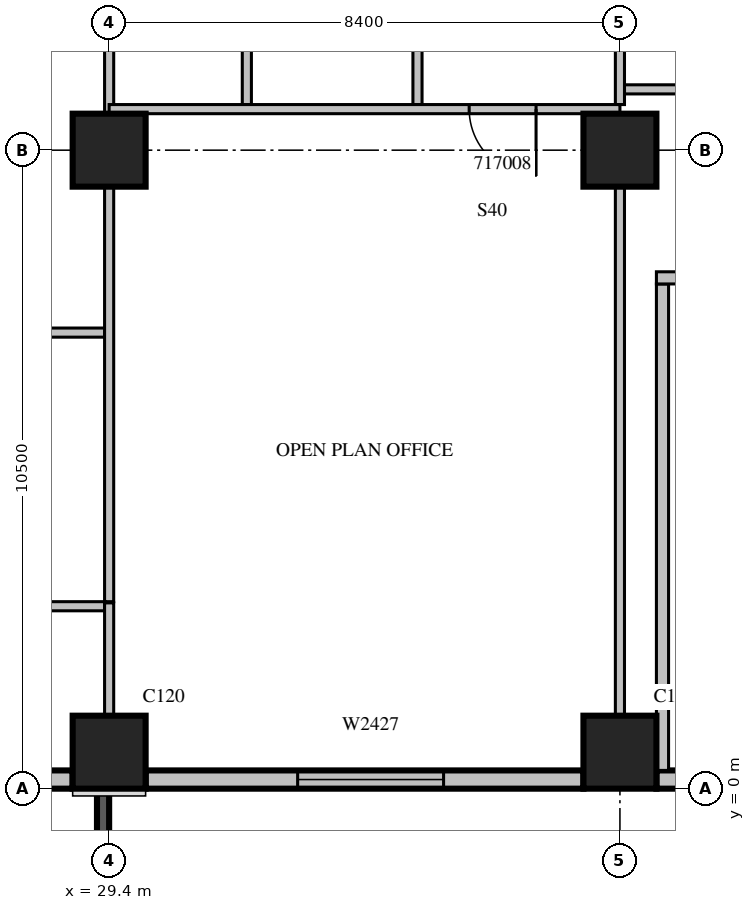
"""IFC4 building model, lengths in metres.
Left out: names, types, materials, properties, quantities, classifications, styles, units other than length and angle.
Written with IfcOpenShell. Run it as: python <this file> out.ifc"""

import sys

from ifc_helpers import new_model, si_unit, direction, frame, frame_2d, origin, origin_2d, place, context, subcontext, project, spatial, rectangle, extrude, source, transform, mapped, element, fill, save


model = new_model("IFC4")
c1 = context("Model", 3, precision=1e-05, world=origin(), true_north=direction((0.0, 1.0)))
c2 = subcontext(c1, "Body", "Model", "MODEL_VIEW")
j1 = project(units=[si_unit("LENGTHUNIT", "METRE"), si_unit("PLANEANGLEUNIT", "RADIAN")], contexts=[c1])
p1 = place(None, origin())
s1 = spatial("IfcSite", under=j1, at=p1, CompositionType="ELEMENT")
p2 = place(p1, origin())
s2 = spatial("IfcBuilding", under=s1, at=p2, CompositionType="ELEMENT")
p3 = place(p2, frame((0.0, 0.0, 82.5)))
s3 = spatial("IfcBuildingStorey", under=s2, at=p3, CompositionType="ELEMENT", Elevation=82.5)
m1 = source(origin(), c2, "Body", "SweptSolid", [
    extrude(rectangle(XDim=1.2, YDim=1.2, at=origin_2d()), origin(), (0.0, 0.0, 1.0), 4.2),
])
for number, where, z_axis, x_axis in (
    (1, (29.4, 0.6, 0.0), (0.0, 0.0, 1.0), (1.0, 0.0, 0.0)),
    (2, (37.8, 0.6, 0.0), (0.0, 0.0, 1.0), (1.0, 0.0, 0.0)),
    (3, (29.4, 10.5, 0.0), (0.0, 0.0, 1.0), (1.0, 0.0, 0.0)),
    (4, (37.8, 10.5, 0.0), (0.0, 0.0, 1.0), (1.0, 0.0, 0.0)),
):
    element("IfcColumn", number, at=place(p3, frame(where, z_axis=z_axis, x_axis=x_axis)), inside=s3, PredefinedType="COLUMN", context=c2, shape_type="MappedRepresentation", body=[
        mapped(m1, transform((0.0, 0.0, 0.0), scale=1.0)),
    ])
m2 = source(origin(), c2, "Body", "SweptSolid", [
    extrude(rectangle(XDim=3.9, YDim=0.2, at=frame_2d((1.95, 0.0))), origin(), (0.0, 0.0, 1.0), 3.8),
])
p4 = place(p3, frame((29.3, 0.0, 0.0), z_axis=(0.0, 0.0, 1.0), x_axis=(0.0, -1.0, 0.0)))
e5 = element("IfcWall", 5, at=p4, inside=s3, PredefinedType="SOLIDWALL", context=c2, shape_type="MappedRepresentation", body=[
    mapped(m2, transform((0.0, 0.0, 0.0), scale=1.0)),
])
m3 = source(origin(), c2, "Body", "SweptSolid", [
    extrude(rectangle(XDim=2.4, YDim=2.7, at=frame_2d((1.2, 1.35))), frame((0.0, 0.11, 0.0), z_axis=(0.0, -1.0, 0.0), x_axis=(1.0, 0.0, 0.0)), (0.0, 0.0, 1.0), 0.22),
])
p5 = place(p4, frame((0.75, 0.0, 0.6)))
e6 = element("IfcOpeningElement", 6, at=p5, cuts=e5, PredefinedType="OPENING", context=c2, shape_type="MappedRepresentation", body=[
    mapped(m3, transform((0.0, 0.0, 0.0), scale=1.0)),
])
m4 = source(origin(), c2, "Body", "SweptSolid", [
    extrude(rectangle(XDim=7.2, YDim=0.3, at=frame_2d((3.6, 0.0))), origin(), (0.0, 0.0, 1.0), 3.8),
])
p6 = place(p3, frame((21.6, 0.15, 0.0), z_axis=(0.0, 0.0, 1.0), x_axis=(1.0, 0.0, 0.0)))
e7 = element("IfcWall", 7, at=p6, inside=s3, PredefinedType="STANDARD", context=c2, shape_type="MappedRepresentation", body=[
    mapped(m4, transform((0.0, 0.0, 0.0), scale=1.0)),
])
m5 = source(origin(), c2, "Body", "SweptSolid", [
    extrude(rectangle(XDim=2.4, YDim=2.7, at=frame_2d((1.2, 1.35))), frame((0.0, 0.16, 0.0), z_axis=(0.0, -1.0, 0.0), x_axis=(1.0, 0.0, 0.0)), (0.0, 0.0, 1.0), 0.32),
])
p7 = place(p6, frame((0.3, 0.0, 0.6)))
e8 = element("IfcOpeningElement", 8, at=p7, cuts=e7, PredefinedType="OPENING", context=c2, shape_type="MappedRepresentation", body=[
    mapped(m5, transform((0.0, 0.0, 0.0), scale=1.0)),
])
m6 = source(origin(), c2, "Body", "SweptSolid", [
    extrude(rectangle(XDim=1.0, YDim=2.1, at=frame_2d((0.5, 1.05))), frame((0.0, 0.16, 0.0), z_axis=(0.0, -1.0, 0.0), x_axis=(1.0, 0.0, 0.0)), (0.0, 0.0, 1.0), 0.32),
])
p8 = place(p6, frame((5.2, 0.0, 0.0)))
e9 = element("IfcOpeningElement", 9, at=p8, cuts=e7, PredefinedType="OPENING", context=c2, shape_type="MappedRepresentation", body=[
    mapped(m6, transform((0.0, 0.0, 0.0), scale=1.0)),
])
p9 = place(p3, frame((30.0, 0.15, 0.0), z_axis=(0.0, 0.0, 1.0), x_axis=(1.0, 0.0, 0.0)))
e10 = element("IfcWall", 10, at=p9, inside=s3, PredefinedType="STANDARD", context=c2, shape_type="MappedRepresentation", body=[
    mapped(m4, transform((0.0, 0.0, 0.0), scale=1.0)),
])
p10 = place(p9, frame((2.5, 0.0, 0.6)))
e11 = element("IfcOpeningElement", 11, at=p10, cuts=e10, PredefinedType="OPENING", context=c2, shape_type="MappedRepresentation", body=[
    mapped(m5, transform((0.0, 0.0, 0.0), scale=1.0)),
])
m7 = source(origin(), c2, "Body", "SweptSolid", [
    extrude(rectangle(XDim=1.8, YDim=0.3, at=frame_2d((0.9, 0.0))), origin(), (0.0, 0.0, 1.0), 3.8),
])
p11 = place(p3, frame((38.4, 0.15, 0.0), z_axis=(0.0, 0.0, 1.0), x_axis=(1.0, 0.0, 0.0)))
e12 = element("IfcWall", 12, at=p11, inside=s3, PredefinedType="STANDARD", context=c2, shape_type="MappedRepresentation", body=[
    mapped(m7, transform((0.0, 0.0, 0.0), scale=1.0)),
])
m8 = source(origin(), c2, "Body", "SweptSolid", [
    extrude(rectangle(XDim=8.0, YDim=0.2, at=frame_2d((4.0, 0.0))), origin(), (0.0, 0.0, 1.0), 3.8),
])
p12 = place(p3, frame((38.5, 0.3, 0.0), z_axis=(0.0, 0.0, 1.0), x_axis=(0.0, 1.0, 0.0)))
e13 = element("IfcWall", 13, at=p12, inside=s3, PredefinedType="PARTITIONING", context=c2, shape_type="MappedRepresentation", body=[
    mapped(m8, transform((0.0, 0.0, 0.0), scale=1.0)),
])
m9 = source(origin(), c2, "Body", "SweptSolid", [
    extrude(rectangle(XDim=5.45, YDim=0.2, at=frame_2d((2.725, 0.0))), origin(), (0.0, 0.0, 1.0), 3.8),
])
p13 = place(p3, frame((38.4, 8.4, 0.0), z_axis=(0.0, 0.0, 1.0), x_axis=(1.0, 0.0, 0.0)))
e14 = element("IfcWall", 14, at=p13, inside=s3, PredefinedType="PARTITIONING", context=c2, shape_type="MappedRepresentation", body=[
    mapped(m9, transform((0.0, 0.0, 0.0), scale=1.0)),
])
m10 = source(origin(), c2, "Body", "SweptSolid", [
    extrude(rectangle(XDim=1.2, YDim=2.1, at=frame_2d((0.6, 1.05))), frame((0.0, 0.11, 0.0), z_axis=(0.0, -1.0, 0.0), x_axis=(1.0, 0.0, 0.0)), (0.0, 0.0, 1.0), 0.22),
])
p14 = place(p13, frame((0.4, 0.0, 0.0)))
e15 = element("IfcOpeningElement", 15, at=p14, cuts=e14, PredefinedType="OPENING", context=c2, shape_type="MappedRepresentation", body=[
    mapped(m10, transform((0.0, 0.0, 0.0), scale=1.0)),
])
m11 = source(origin(), c2, "Body", "SweptSolid", [
    extrude(rectangle(XDim=0.9, YDim=2.1, at=frame_2d((0.45, 1.05))), frame((0.0, 0.11, 0.0), z_axis=(0.0, -1.0, 0.0), x_axis=(1.0, 0.0, 0.0)), (0.0, 0.0, 1.0), 0.22),
])
p15 = place(p13, frame((3.25, 0.0, 0.0)))
e16 = element("IfcOpeningElement", 16, at=p15, cuts=e14, PredefinedType="OPENING", context=c2, shape_type="MappedRepresentation", body=[
    mapped(m11, transform((0.0, 0.0, 0.0), scale=1.0)),
])
m12 = source(origin(), c2, "Body", "SweptSolid", [
    extrude(rectangle(XDim=4.45, YDim=0.15, at=frame_2d((2.225, 0.0))), origin(), (0.0, 0.0, 1.0), 3.8),
])
p16 = place(p3, frame((29.325, 7.5, 0.0), z_axis=(0.0, 0.0, 1.0), x_axis=(-1.0, 0.0, 0.0)))
e17 = element("IfcWall", 17, at=p16, inside=s3, PredefinedType="PARTITIONING", context=c2, shape_type="MappedRepresentation", body=[
    mapped(m12, transform((0.0, 0.0, 0.0), scale=1.0)),
])
m13 = source(origin(), c2, "Body", "SweptSolid", [
    extrude(rectangle(XDim=6.826, YDim=0.15, at=frame_2d((3.413, 0.0))), origin(), (0.0, 0.0, 1.0), 3.8),
])
p17 = place(p3, frame((29.4, 3.075, 0.0), z_axis=(0.0, 0.0, 1.0), x_axis=(0.0, 1.0, 0.0)))
e18 = element("IfcWall", 18, at=p17, inside=s3, PredefinedType="PARTITIONING", context=c2, shape_type="MappedRepresentation", body=[
    mapped(m13, transform((0.0, 0.0, 0.0), scale=1.0)),
])
m14 = source(origin(), c2, "Body", "SweptSolid", [
    extrude(rectangle(XDim=3.601, YDim=0.15, at=frame_2d((1.8, 0.0))), origin(), (0.0, 0.0, 1.0), 3.8),
])
p18 = place(p3, frame((29.4, 11.099, 0.0), z_axis=(0.0, 0.0, 1.0), x_axis=(0.0, 1.0, 0.0)))
e19 = element("IfcWall", 19, at=p18, inside=s3, PredefinedType="PARTITIONING", context=c2, shape_type="MappedRepresentation", body=[
    mapped(m14, transform((0.0, 0.0, 0.0), scale=1.0)),
])
m15 = source(origin(), c2, "Body", "SweptSolid", [
    extrude(rectangle(XDim=7.125, YDim=0.15, at=frame_2d((3.562, 0.0))), origin(), (0.0, 0.0, 1.0), 3.8),
])
p19 = place(p3, frame((22.2, 3.0, 0.0), z_axis=(0.0, 0.0, 1.0), x_axis=(1.0, 0.0, 0.0)))
e20 = element("IfcWall", 20, at=p19, inside=s3, PredefinedType="PARTITIONING", context=c2, shape_type="MappedRepresentation", body=[
    mapped(m15, transform((0.0, 0.0, 0.0), scale=1.0)),
])
m16 = source(origin(), c2, "Body", "SweptSolid", [
    extrude(rectangle(XDim=1.0, YDim=2.1, at=frame_2d((0.5, 1.05))), frame((0.0, 0.085, 0.0), z_axis=(0.0, -1.0, 0.0), x_axis=(1.0, 0.0, 0.0)), (0.0, 0.0, 1.0), 0.17),
])
p20 = place(p19, frame((3.1, 0.0, 0.0)))
e21 = element("IfcOpeningElement", 21, at=p20, cuts=e20, PredefinedType="OPENING", context=c2, shape_type="MappedRepresentation", body=[
    mapped(m16, transform((0.0, 0.0, 0.0), scale=1.0)),
])
m17 = source(origin(), c2, "Body", "SweptSolid", [
    extrude(rectangle(XDim=0.9, YDim=2.1, at=frame_2d((0.45, 1.05))), frame((0.0, 0.085, 0.0), z_axis=(0.0, -1.0, 0.0), x_axis=(1.0, 0.0, 0.0)), (0.0, 0.0, 1.0), 0.17),
])
p21 = place(p19, frame((4.162, 0.0, 0.0)))
e22 = element("IfcOpeningElement", 22, at=p21, cuts=e20, PredefinedType="OPENING", context=c2, shape_type="MappedRepresentation", body=[
    mapped(m17, transform((0.0, 0.0, 0.0), scale=1.0)),
])
m18 = source(origin(), c2, "Body", "SweptSolid", [
    extrude(rectangle(XDim=6.45, YDim=0.15, at=frame_2d((3.225, 0.0))), origin(), (0.0, 0.0, 1.0), 3.8),
])
p22 = place(p3, frame((37.875, 11.5, 0.0), z_axis=(0.0, 0.0, 1.0), x_axis=(1.0, 0.0, 0.0)))
e23 = element("IfcWall", 23, at=p22, inside=s3, PredefinedType="PARTITIONING", context=c2, shape_type="MappedRepresentation", body=[
    mapped(m18, transform((0.0, 0.0, 0.0), scale=1.0)),
])
m19 = source(origin(), c2, "Body", "SweptSolid", [
    extrude(rectangle(XDim=3.45, YDim=0.15, at=frame_2d((1.725, 0.0))), origin(), (0.0, 0.0, 1.0), 3.8),
])
for number, where, z_axis, x_axis in (
    (24, (31.665, 11.25, 0.0), (0.0, 0.0, 1.0), (0.0, 1.0, 0.0)),
    (25, (34.471, 11.25, 0.0), (0.0, 0.0, 1.0), (0.0, 1.0, 0.0)),
):
    element("IfcWall", number, at=place(p3, frame(where, z_axis=z_axis, x_axis=x_axis)), inside=s3, PredefinedType="PARTITIONING", context=c2, shape_type="MappedRepresentation", body=[
        mapped(m19, transform((0.0, 0.0, 0.0), scale=1.0)),
    ])
m20 = source(origin(), c2, "Body", "SweptSolid", [
    extrude(rectangle(XDim=1.856, YDim=0.15, at=frame_2d((0.928, 0.0))), origin(), (0.0, 0.0, 1.0), 3.8),
])
p23 = place(p3, frame((29.4, 1.199, 0.0), z_axis=(0.0, 0.0, 1.0), x_axis=(0.0, 1.0, 0.0)))
e26 = element("IfcWall", 26, at=p23, inside=s3, PredefinedType="PARTITIONING", context=c2, shape_type="MappedRepresentation", body=[
    mapped(m20, transform((0.0, 0.0, 0.0), scale=1.0)),
])
m21 = source(origin(), c2, "Body", "SweptSolid", [
    extrude(rectangle(XDim=8.702, YDim=0.15, at=frame_2d((4.351, 0.0))), origin(), (0.0, 0.0, 1.0), 3.8),
])
p24 = place(p3, frame((37.8, 1.199, 0.0), z_axis=(0.0, 0.0, 1.0), x_axis=(0.0, 1.0, 0.0)))
e27 = element("IfcWall", 27, at=p24, inside=s3, PredefinedType="PARTITIONING", context=c2, shape_type="MappedRepresentation", body=[
    mapped(m21, transform((0.0, 0.0, 0.0), scale=1.0)),
])
p25 = place(p3, frame((37.8, 11.25, 0.0), z_axis=(0.0, 0.0, 1.0), x_axis=(0.0, 1.0, 0.0)))
e28 = element("IfcWall", 28, at=p25, inside=s3, PredefinedType="PARTITIONING", context=c2, shape_type="MappedRepresentation", body=[
    mapped(m19, transform((0.0, 0.0, 0.0), scale=1.0)),
])
m22 = source(origin(), c2, "Body", "SweptSolid", [
    extrude(rectangle(XDim=8.4, YDim=0.15, at=frame_2d((4.2, 0.0))), origin(), (0.0, 0.0, 1.0), 3.8),
])
p26 = place(p3, frame((37.8, 11.175, 0.0), z_axis=(0.0, 0.0, 1.0), x_axis=(-1.0, 0.0, 0.0)))
e29 = element("IfcWall", 29, at=p26, inside=s3, PredefinedType="PARTITIONING", context=c2, shape_type="MappedRepresentation", body=[
    mapped(m22, transform((0.0, 0.0, 0.0), scale=1.0)),
])
m23 = source(origin(), c2, "Body", "SweptSolid", [
    extrude(rectangle(XDim=1.1, YDim=2.1, at=frame_2d((0.55, 1.05))), frame((0.0, 0.085, 0.0), z_axis=(0.0, -1.0, 0.0), x_axis=(1.0, 0.0, 0.0)), (0.0, 0.0, 1.0), 0.17),
])
p27 = place(p26, frame((1.379, 0.0, 0.0)))
e30 = element("IfcOpeningElement", 30, at=p27, cuts=e29, PredefinedType="OPENING", context=c2, shape_type="MappedRepresentation", body=[
    mapped(m23, transform((0.0, 0.0, 0.0), scale=1.0)),
])
m24 = source(origin(), c2, "Body", "SweptSolid", [
    extrude(rectangle(XDim=2.4, YDim=2.7, at=frame_2d((1.2, 1.35))), frame((0.0, 0.03, 0.0), z_axis=(0.0, -1.0, 0.0), x_axis=(1.0, 0.0, 0.0)), (0.0, 0.0, 1.0), 0.06),
])
p28 = place(p10, origin())
e31 = element("IfcWindow", 31, at=p28, inside=s3, PartitioningType="SINGLE_PANEL", PredefinedType="WINDOW", context=c2, shape_type="MappedRepresentation", body=[
    mapped(m24, transform((0.0, 0.0, 0.0), scale=1.0)),
])
fill(e11, e31)
m25 = source(origin(), c2, "Body", "SweptSolid", [
    extrude(rectangle(XDim=1.1, YDim=2.1, at=frame_2d((0.55, 1.05))), frame((0.0, 0.025, 0.0), z_axis=(0.0, -1.0, 0.0), x_axis=(1.0, 0.0, 0.0)), (0.0, 0.0, 1.0), 0.05),
])
p29 = place(p27, origin())
e32 = element("IfcDoor", 32, at=p29, inside=s3, OperationType="SINGLE_SWING_LEFT", PredefinedType="DOOR", context=c2, shape_type="MappedRepresentation", body=[
    mapped(m25, transform((0.0, 0.0, 0.0), scale=1.0)),
])
fill(e30, e32)
save(model, sys.argv[1])
